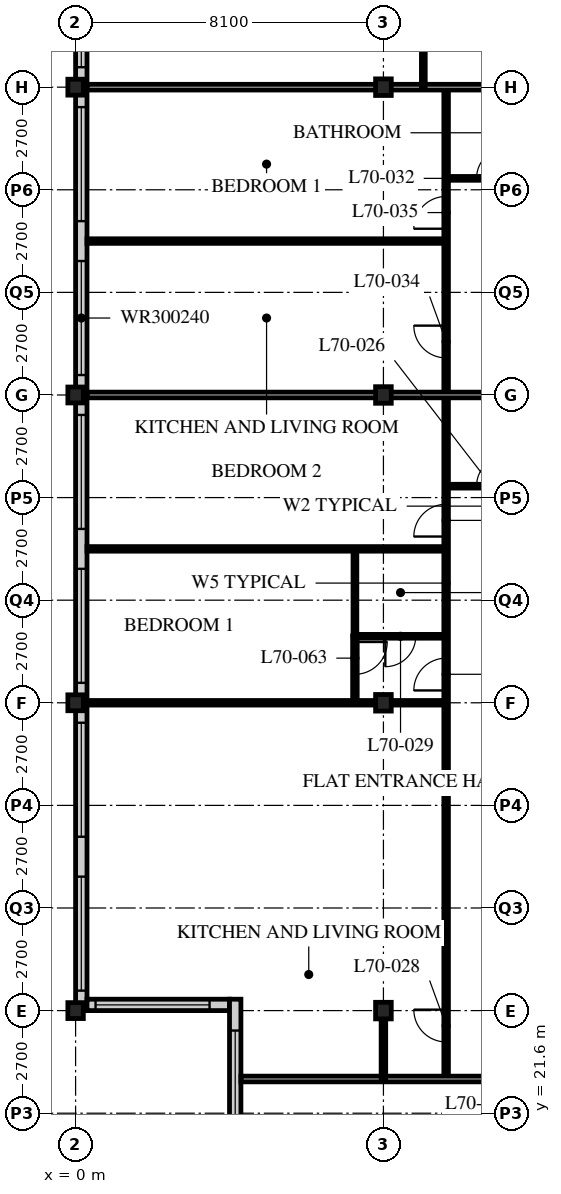
"""IFC4 building model, lengths in metres.
Left out: names, types, materials, properties, quantities, classifications, styles, units other than length and angle.
Written with IfcOpenShell. Run it as: python <this file> out.ifc"""

import sys

from ifc_helpers import new_model, si_unit, direction, frame, frame_2d, origin, origin_2d, place, context, subcontext, project, spatial, rectangle, i_section, extrude, element, fill, save


model = new_model("IFC4")
c1 = context("Model", 3, precision=1e-05, world=origin(), true_north=direction((0.0, 1.0)))
c2 = subcontext(c1, "Body", "Model", "MODEL_VIEW")
j1 = project(units=[si_unit("LENGTHUNIT", "METRE"), si_unit("PLANEANGLEUNIT", "RADIAN")], contexts=[c1])
p1 = place(None, origin())
s1 = spatial("IfcSite", under=j1, at=p1, CompositionType="ELEMENT")
p2 = place(p1, origin())
s2 = spatial("IfcBuilding", under=s1, at=p2, CompositionType="ELEMENT")
p3 = place(p2, frame((0.0, 0.0, 273.6)))
s3 = spatial("IfcBuildingStorey", under=s2, at=p3, CompositionType="ELEMENT", Elevation=273.6)
for number, where, z_axis, x_axis in (
    (1, (0.0, 24.3, 0.0), (0.0, 0.0, 1.0), (1.0, 0.0, 0.0)),
    (2, (0.0, 32.4, 0.0), (0.0, 0.0, 1.0), (1.0, 0.0, 0.0)),
    (3, (0.0, 40.5, 0.0), (0.0, 0.0, 1.0), (1.0, 0.0, 0.0)),
    (4, (0.0, 48.6, 0.0), (0.0, 0.0, 1.0), (1.0, 0.0, 0.0)),
):
    element("IfcColumn", number, at=place(p3, frame(where, z_axis=z_axis, x_axis=x_axis)), inside=s3, PredefinedType="COLUMN", context=c2, shape_type="SweptSolid", body=[
        extrude(i_section(OverallWidth=0.407, OverallDepth=0.419, WebThickness=0.031, FlangeThickness=0.049, FilletRadius=0.015, at=origin_2d()), origin(), (0.0, 0.0, 1.0), 3.9),
    ])
for number, where, z_axis, x_axis in (
    (5, (8.1, 24.3, 0.0), (0.0, 0.0, 1.0), (1.0, 0.0, 0.0)),
    (6, (8.1, 32.4, 0.0), (0.0, 0.0, 1.0), (1.0, 0.0, 0.0)),
    (7, (8.1, 40.5, 0.0), (0.0, 0.0, 1.0), (1.0, 0.0, 0.0)),
    (8, (8.1, 48.6, 0.0), (0.0, 0.0, 1.0), (1.0, 0.0, 0.0)),
):
    element("IfcColumn", number, at=place(p3, frame(where, z_axis=z_axis, x_axis=x_axis)), inside=s3, PredefinedType="COLUMN", context=c2, shape_type="SweptSolid", body=[
        extrude(i_section(OverallWidth=0.412, OverallDepth=0.437, WebThickness=0.036, FlangeThickness=0.058, FilletRadius=0.015, at=origin_2d()), origin(), (0.0, 0.0, 1.0), 3.9),
    ])
p4 = place(p3, frame((0.15, 56.4, 0.0), z_axis=(0.0, 0.0, 1.0), x_axis=(0.0, -1.0, 0.0)))
e9 = element("IfcWall", 9, at=p4, inside=s3, PredefinedType="SOLIDWALL", context=c2, shape_type="SweptSolid", body=[
    extrude(rectangle(XDim=32.1, YDim=0.3, at=frame_2d((16.05, 0.0))), origin(), (0.0, 0.0, 1.0), 3.69),
])
p5 = place(p4, frame((0.225, 0.0, 0.6)))
e10 = element("IfcOpeningElement", 10, at=p5, cuts=e9, PredefinedType="OPENING", context=c2, shape_type="SweptSolid", body=[
    extrude(rectangle(XDim=3.0, YDim=2.4, at=frame_2d((1.5, 1.2))), frame((0.0, 0.16, 0.0), z_axis=(0.0, -1.0, 0.0), x_axis=(1.0, 0.0, 0.0)), (0.0, 0.0, 1.0), 0.32),
])
p6 = place(p4, frame((4.275, 0.0, 0.6)))
e11 = element("IfcOpeningElement", 11, at=p6, cuts=e9, PredefinedType="OPENING", context=c2, shape_type="SweptSolid", body=[
    extrude(rectangle(XDim=3.0, YDim=2.4, at=frame_2d((1.5, 1.2))), frame((0.0, 0.16, 0.0), z_axis=(0.0, -1.0, 0.0), x_axis=(1.0, 0.0, 0.0)), (0.0, 0.0, 1.0), 0.32),
])
p7 = place(p4, frame((8.325, 0.0, 0.6)))
e12 = element("IfcOpeningElement", 12, at=p7, cuts=e9, PredefinedType="OPENING", context=c2, shape_type="SweptSolid", body=[
    extrude(rectangle(XDim=3.0, YDim=2.4, at=frame_2d((1.5, 1.2))), frame((0.0, 0.16, 0.0), z_axis=(0.0, -1.0, 0.0), x_axis=(1.0, 0.0, 0.0)), (0.0, 0.0, 1.0), 0.32),
])
p8 = place(p4, frame((12.375, 0.0, 0.6)))
e13 = element("IfcOpeningElement", 13, at=p8, cuts=e9, PredefinedType="OPENING", context=c2, shape_type="SweptSolid", body=[
    extrude(rectangle(XDim=3.0, YDim=2.4, at=frame_2d((1.5, 1.2))), frame((0.0, 0.16, 0.0), z_axis=(0.0, -1.0, 0.0), x_axis=(1.0, 0.0, 0.0)), (0.0, 0.0, 1.0), 0.32),
])
p9 = place(p4, frame((16.425, 0.0, 0.6)))
e14 = element("IfcOpeningElement", 14, at=p9, cuts=e9, PredefinedType="OPENING", context=c2, shape_type="SweptSolid", body=[
    extrude(rectangle(XDim=3.0, YDim=2.4, at=frame_2d((1.5, 1.2))), frame((0.0, 0.16, 0.0), z_axis=(0.0, -1.0, 0.0), x_axis=(1.0, 0.0, 0.0)), (0.0, 0.0, 1.0), 0.32),
])
p10 = place(p4, frame((20.475, 0.0, 0.6)))
e15 = element("IfcOpeningElement", 15, at=p10, cuts=e9, PredefinedType="OPENING", context=c2, shape_type="SweptSolid", body=[
    extrude(rectangle(XDim=3.0, YDim=2.4, at=frame_2d((1.5, 1.2))), frame((0.0, 0.16, 0.0), z_axis=(0.0, -1.0, 0.0), x_axis=(1.0, 0.0, 0.0)), (0.0, 0.0, 1.0), 0.32),
])
p11 = place(p4, frame((24.525, 0.0, 0.6)))
e16 = element("IfcOpeningElement", 16, at=p11, cuts=e9, PredefinedType="OPENING", context=c2, shape_type="SweptSolid", body=[
    extrude(rectangle(XDim=3.0, YDim=2.4, at=frame_2d((1.5, 1.2))), frame((0.0, 0.16, 0.0), z_axis=(0.0, -1.0, 0.0), x_axis=(1.0, 0.0, 0.0)), (0.0, 0.0, 1.0), 0.32),
])
p12 = place(p4, frame((28.575, 0.0, 0.6)))
e17 = element("IfcOpeningElement", 17, at=p12, cuts=e9, PredefinedType="OPENING", context=c2, shape_type="SweptSolid", body=[
    extrude(rectangle(XDim=3.0, YDim=2.4, at=frame_2d((1.5, 1.2))), frame((0.0, 0.16, 0.0), z_axis=(0.0, -1.0, 0.0), x_axis=(1.0, 0.0, 0.0)), (0.0, 0.0, 1.0), 0.32),
])
p13 = place(p3, frame((0.3, 24.45, 0.0), z_axis=(0.0, 0.0, 1.0), x_axis=(1.0, 0.0, 0.0)))
e18 = element("IfcWall", 18, at=p13, inside=s3, PredefinedType="SOLIDWALL", context=c2, shape_type="SweptSolid", body=[
    extrude(rectangle(XDim=3.75, YDim=0.3, at=frame_2d((1.875, 0.0))), origin(), (0.0, 0.0, 1.0), 3.69),
])
p14 = place(p13, frame((0.225, 0.0, 0.6)))
e19 = element("IfcOpeningElement", 19, at=p14, cuts=e18, PredefinedType="OPENING", context=c2, shape_type="SweptSolid", body=[
    extrude(rectangle(XDim=3.0, YDim=2.3, at=frame_2d((1.5, 1.15))), frame((0.0, 0.16, 0.0), z_axis=(0.0, -1.0, 0.0), x_axis=(1.0, 0.0, 0.0)), (0.0, 0.0, 1.0), 0.32),
])
p15 = place(p3, frame((4.2, 24.6, 0.0), z_axis=(0.0, 0.0, 1.0), x_axis=(0.0, -1.0, 0.0)))
e20 = element("IfcWall", 20, at=p15, inside=s3, PredefinedType="SOLIDWALL", context=c2, shape_type="SweptSolid", body=[
    extrude(rectangle(XDim=4.35, YDim=0.3, at=frame_2d((2.175, 0.0))), origin(), (0.0, 0.0, 1.0), 3.69),
])
p16 = place(p15, frame((0.825, 0.0, 0.6)))
e21 = element("IfcOpeningElement", 21, at=p16, cuts=e20, PredefinedType="OPENING", context=c2, shape_type="SweptSolid", body=[
    extrude(rectangle(XDim=3.0, YDim=2.3, at=frame_2d((1.5, 1.15))), frame((0.0, 0.16, 0.0), z_axis=(0.0, -1.0, 0.0), x_axis=(1.0, 0.0, 0.0)), (0.0, 0.0, 1.0), 0.32),
])
p17 = place(p3, frame((9.75, 22.5, 0.0), z_axis=(0.0, 0.0, 1.0), x_axis=(0.0, 1.0, 0.0)))
e22 = element("IfcWall", 22, at=p17, inside=s3, PredefinedType="PARTITIONING", context=c2, shape_type="SweptSolid", body=[
    extrude(rectangle(XDim=26.1, YDim=0.12, at=frame_2d((13.05, 0.0))), origin(), (0.0, 0.0, 1.0), 3.69),
])
p18 = place(p17, frame((0.975, 0.0, 0.0)))
e23 = element("IfcOpeningElement", 23, at=p18, cuts=e22, PredefinedType="OPENING", context=c2, shape_type="SweptSolid", body=[
    extrude(rectangle(XDim=0.85, YDim=2.1, at=frame_2d((0.425, 1.05))), frame((0.0, 0.07, 0.0), z_axis=(0.0, -1.0, 0.0), x_axis=(1.0, 0.0, 0.0)), (0.0, 0.0, 1.0), 0.14),
])
p19 = place(p17, frame((10.225, 0.0, 0.0)))
e24 = element("IfcOpeningElement", 24, at=p19, cuts=e22, PredefinedType="OPENING", context=c2, shape_type="SweptSolid", body=[
    extrude(rectangle(XDim=0.85, YDim=2.1, at=frame_2d((0.425, 1.05))), frame((0.0, 0.07, 0.0), z_axis=(0.0, -1.0, 0.0), x_axis=(1.0, 0.0, 0.0)), (0.0, 0.0, 1.0), 0.14),
])
p20 = place(p17, frame((14.275, 0.0, 0.0)))
e25 = element("IfcOpeningElement", 25, at=p20, cuts=e22, PredefinedType="OPENING", context=c2, shape_type="SweptSolid", body=[
    extrude(rectangle(XDim=0.85, YDim=2.1, at=frame_2d((0.425, 1.05))), frame((0.0, 0.07, 0.0), z_axis=(0.0, -1.0, 0.0), x_axis=(1.0, 0.0, 0.0)), (0.0, 0.0, 1.0), 0.14),
])
p21 = place(p17, frame((18.975, 0.0, 0.0)))
e26 = element("IfcOpeningElement", 26, at=p21, cuts=e22, PredefinedType="OPENING", context=c2, shape_type="SweptSolid", body=[
    extrude(rectangle(XDim=0.85, YDim=2.1, at=frame_2d((0.425, 1.05))), frame((0.0, 0.07, 0.0), z_axis=(0.0, -1.0, 0.0), x_axis=(1.0, 0.0, 0.0)), (0.0, 0.0, 1.0), 0.14),
])
p22 = place(p17, frame((22.375, 0.0, 0.0)))
e27 = element("IfcOpeningElement", 27, at=p22, cuts=e22, PredefinedType="OPENING", context=c2, shape_type="SweptSolid", body=[
    extrude(rectangle(XDim=0.85, YDim=2.1, at=frame_2d((0.425, 1.05))), frame((0.0, 0.07, 0.0), z_axis=(0.0, -1.0, 0.0), x_axis=(1.0, 0.0, 0.0)), (0.0, 0.0, 1.0), 0.14),
])
p23 = place(p3, frame((12.15, 38.1, 0.0), z_axis=(0.0, 0.0, 1.0), x_axis=(-1.0, 0.0, 0.0)))
e28 = element("IfcWall", 28, at=p23, inside=s3, PredefinedType="PARTITIONING", context=c2, shape_type="SweptSolid", body=[
    extrude(rectangle(XDim=2.4, YDim=0.1, at=frame_2d((1.2, 0.0))), origin(), (0.0, 0.0, 1.0), 3.69),
])
p24 = place(p23, frame((0.8, 0.0, 0.0)))
e29 = element("IfcOpeningElement", 29, at=p24, cuts=e28, PredefinedType="OPENING", context=c2, shape_type="SweptSolid", body=[
    extrude(rectangle(XDim=0.8, YDim=2.1, at=frame_2d((0.4, 1.05))), frame((0.0, 0.06, 0.0), z_axis=(0.0, -1.0, 0.0), x_axis=(1.0, 0.0, 0.0)), (0.0, 0.0, 1.0), 0.12),
])
p25 = place(p3, frame((9.75, 34.15, 0.0), z_axis=(0.0, 0.0, 1.0), x_axis=(-1.0, 0.0, 0.0)))
e30 = element("IfcWall", 30, at=p25, inside=s3, PredefinedType="PARTITIONING", context=c2, shape_type="SweptSolid", body=[
    extrude(rectangle(XDim=2.4, YDim=0.1, at=frame_2d((1.2, 0.0))), origin(), (0.0, 0.0, 1.0), 3.69),
])
p26 = place(p25, frame((0.8, 0.0, 0.0)))
e31 = element("IfcOpeningElement", 31, at=p26, cuts=e30, PredefinedType="OPENING", context=c2, shape_type="SweptSolid", body=[
    extrude(rectangle(XDim=0.8, YDim=2.1, at=frame_2d((0.4, 1.05))), frame((0.0, 0.06, 0.0), z_axis=(0.0, -1.0, 0.0), x_axis=(1.0, 0.0, 0.0)), (0.0, 0.0, 1.0), 0.12),
])
p27 = place(p3, frame((7.35, 34.15, 0.0), z_axis=(0.0, 0.0, 1.0), x_axis=(0.0, 1.0, 0.0)))
e32 = element("IfcWall", 32, at=p27, inside=s3, PredefinedType="PARTITIONING", context=c2, shape_type="SweptSolid", body=[
    extrude(rectangle(XDim=2.3, YDim=0.1, at=frame_2d((1.15, 0.0))), origin(), (0.0, 0.0, 1.0), 3.69),
])
p28 = place(p3, frame((9.75, 32.4, 0.0), z_axis=(0.0, 0.0, 1.0), x_axis=(-1.0, 0.0, 0.0)))
e33 = element("IfcWall", 33, at=p28, inside=s3, PredefinedType="PARTITIONING", context=c2, shape_type="SweptSolid", body=[
    extrude(rectangle(XDim=9.45, YDim=0.12, at=frame_2d((4.725, 0.0))), origin(), (0.0, 0.0, 1.0), 3.078),
])
p29 = place(p3, frame((9.75, 36.45, 0.0), z_axis=(0.0, 0.0, 1.0), x_axis=(-1.0, 0.0, 0.0)))
e34 = element("IfcWall", 34, at=p29, inside=s3, PredefinedType="PARTITIONING", context=c2, shape_type="SweptSolid", body=[
    extrude(rectangle(XDim=9.45, YDim=0.12, at=frame_2d((4.725, 0.0))), origin(), (0.0, 0.0, 1.0), 3.69),
])
p30 = place(p3, frame((12.15, 40.5, 0.0), z_axis=(0.0, 0.0, 1.0), x_axis=(-1.0, 0.0, 0.0)))
e35 = element("IfcWall", 35, at=p30, inside=s3, PredefinedType="PARTITIONING", context=c2, shape_type="SweptSolid", body=[
    extrude(rectangle(XDim=11.85, YDim=0.15, at=frame_2d((5.925, 0.0))), origin(), (0.0, 0.0, 1.0), 3.078),
])
p31 = place(p3, frame((12.15, 46.2, 0.0), z_axis=(0.0, 0.0, 1.0), x_axis=(-1.0, 0.0, 0.0)))
e36 = element("IfcWall", 36, at=p31, inside=s3, PredefinedType="PARTITIONING", context=c2, shape_type="SweptSolid", body=[
    extrude(rectangle(XDim=2.4, YDim=0.1, at=frame_2d((1.2, 0.0))), origin(), (0.0, 0.0, 1.0), 3.69),
])
p32 = place(p31, frame((0.8, 0.0, 0.0)))
e37 = element("IfcOpeningElement", 37, at=p32, cuts=e36, PredefinedType="OPENING", context=c2, shape_type="SweptSolid", body=[
    extrude(rectangle(XDim=0.8, YDim=2.1, at=frame_2d((0.4, 1.05))), frame((0.0, 0.06, 0.0), z_axis=(0.0, -1.0, 0.0), x_axis=(1.0, 0.0, 0.0)), (0.0, 0.0, 1.0), 0.12),
])
p33 = place(p3, frame((9.75, 44.55, 0.0), z_axis=(0.0, 0.0, 1.0), x_axis=(-1.0, 0.0, 0.0)))
e38 = element("IfcWall", 38, at=p33, inside=s3, PredefinedType="PARTITIONING", context=c2, shape_type="SweptSolid", body=[
    extrude(rectangle(XDim=9.45, YDim=0.12, at=frame_2d((4.725, 0.0))), origin(), (0.0, 0.0, 1.0), 3.69),
])
p34 = place(p3, frame((12.15, 48.6, 0.0), z_axis=(0.0, 0.0, 1.0), x_axis=(-1.0, 0.0, 0.0)))
e39 = element("IfcWall", 39, at=p34, inside=s3, PredefinedType="PARTITIONING", context=c2, shape_type="SweptSolid", body=[
    extrude(rectangle(XDim=11.85, YDim=0.15, at=frame_2d((5.925, 0.0))), origin(), (0.0, 0.0, 1.0), 3.078),
])
p35 = place(p3, frame((9.15, 48.6, 0.0), z_axis=(0.0, 0.0, 1.0), x_axis=(0.0, 1.0, 0.0)))
e40 = element("IfcWall", 40, at=p35, inside=s3, PredefinedType="PARTITIONING", context=c2, shape_type="SweptSolid", body=[
    extrude(rectangle(XDim=2.2, YDim=0.1, at=frame_2d((1.1, 0.0))), origin(), (0.0, 0.0, 1.0), 3.69),
])
p36 = place(p3, frame((4.35, 22.5, 0.0), z_axis=(0.0, 0.0, 1.0), x_axis=(1.0, 0.0, 0.0)))
e41 = element("IfcWall", 41, at=p36, inside=s3, PredefinedType="PARTITIONING", context=c2, shape_type="SweptSolid", body=[
    extrude(rectangle(XDim=7.8, YDim=0.15, at=frame_2d((3.9, 0.0))), origin(), (0.0, 0.0, 1.0), 3.69),
])
p37 = place(p3, frame((7.35, 32.4, 0.0), z_axis=(0.0, 0.0, 1.0), x_axis=(0.0, 1.0, 0.0)))
e42 = element("IfcWall", 42, at=p37, inside=s3, PredefinedType="PARTITIONING", context=c2, shape_type="SweptSolid", body=[
    extrude(rectangle(XDim=1.76, YDim=0.12, at=frame_2d((0.88, 0.0))), origin(), (0.0, 0.0, 1.0), 3.69),
])
p38 = place(p37, frame((0.75, 0.0, 0.0)))
e43 = element("IfcOpeningElement", 43, at=p38, cuts=e42, PredefinedType="OPENING", context=c2, shape_type="SweptSolid", body=[
    extrude(rectangle(XDim=0.85, YDim=2.1, at=frame_2d((0.425, 1.05))), frame((0.0, 0.07, 0.0), z_axis=(0.0, -1.0, 0.0), x_axis=(1.0, 0.0, 0.0)), (0.0, 0.0, 1.0), 0.14),
])
p39 = place(p3, frame((8.1, 22.5, 0.0), z_axis=(0.0, 0.0, 1.0), x_axis=(0.0, 1.0, 0.0)))
e44 = element("IfcWall", 44, at=p39, inside=s3, PredefinedType="PARTITIONING", context=c2, shape_type="SweptSolid", body=[
    extrude(rectangle(XDim=1.597, YDim=0.12, at=frame_2d((0.798, 0.0))), origin(), (0.0, 0.0, 1.0), 3.078),
])
p40 = place(p6, origin())
e45 = element("IfcWindow", 45, at=p40, inside=s3, PartitioningType="SINGLE_PANEL", PredefinedType="WINDOW", context=c2, shape_type="SweptSolid", body=[
    extrude(rectangle(XDim=3.0, YDim=2.4, at=frame_2d((1.5, 1.2))), frame((0.0, 0.03, 0.0), z_axis=(0.0, -1.0, 0.0), x_axis=(1.0, 0.0, 0.0)), (0.0, 0.0, 1.0), 0.06),
])
fill(e11, e45)
p41 = place(p7, origin())
e46 = element("IfcWindow", 46, at=p41, inside=s3, PartitioningType="SINGLE_PANEL", PredefinedType="WINDOW", context=c2, shape_type="SweptSolid", body=[
    extrude(rectangle(XDim=3.0, YDim=2.4, at=frame_2d((1.5, 1.2))), frame((0.0, 0.03, 0.0), z_axis=(0.0, -1.0, 0.0), x_axis=(1.0, 0.0, 0.0)), (0.0, 0.0, 1.0), 0.06),
])
fill(e12, e46)
p42 = place(p8, origin())
e47 = element("IfcWindow", 47, at=p42, inside=s3, PartitioningType="SINGLE_PANEL", PredefinedType="WINDOW", context=c2, shape_type="SweptSolid", body=[
    extrude(rectangle(XDim=3.0, YDim=2.4, at=frame_2d((1.5, 1.2))), frame((0.0, 0.03, 0.0), z_axis=(0.0, -1.0, 0.0), x_axis=(1.0, 0.0, 0.0)), (0.0, 0.0, 1.0), 0.06),
])
fill(e13, e47)
p43 = place(p9, origin())
e48 = element("IfcWindow", 48, at=p43, inside=s3, PartitioningType="SINGLE_PANEL", PredefinedType="WINDOW", context=c2, shape_type="SweptSolid", body=[
    extrude(rectangle(XDim=3.0, YDim=2.4, at=frame_2d((1.5, 1.2))), frame((0.0, 0.03, 0.0), z_axis=(0.0, -1.0, 0.0), x_axis=(1.0, 0.0, 0.0)), (0.0, 0.0, 1.0), 0.06),
])
fill(e14, e48)
p44 = place(p10, origin())
e49 = element("IfcWindow", 49, at=p44, inside=s3, PartitioningType="SINGLE_PANEL", PredefinedType="WINDOW", context=c2, shape_type="SweptSolid", body=[
    extrude(rectangle(XDim=3.0, YDim=2.4, at=frame_2d((1.5, 1.2))), frame((0.0, 0.03, 0.0), z_axis=(0.0, -1.0, 0.0), x_axis=(1.0, 0.0, 0.0)), (0.0, 0.0, 1.0), 0.06),
])
fill(e15, e49)
p45 = place(p11, origin())
e50 = element("IfcWindow", 50, at=p45, inside=s3, PartitioningType="SINGLE_PANEL", PredefinedType="WINDOW", context=c2, shape_type="SweptSolid", body=[
    extrude(rectangle(XDim=3.0, YDim=2.4, at=frame_2d((1.5, 1.2))), frame((0.0, 0.03, 0.0), z_axis=(0.0, -1.0, 0.0), x_axis=(1.0, 0.0, 0.0)), (0.0, 0.0, 1.0), 0.06),
])
fill(e16, e50)
p46 = place(p12, origin())
e51 = element("IfcWindow", 51, at=p46, inside=s3, PartitioningType="SINGLE_PANEL", PredefinedType="WINDOW", context=c2, shape_type="SweptSolid", body=[
    extrude(rectangle(XDim=3.0, YDim=2.4, at=frame_2d((1.5, 1.2))), frame((0.0, 0.03, 0.0), z_axis=(0.0, -1.0, 0.0), x_axis=(1.0, 0.0, 0.0)), (0.0, 0.0, 1.0), 0.06),
])
fill(e17, e51)
p47 = place(p14, origin())
e52 = element("IfcWindow", 52, at=p47, inside=s3, PartitioningType="SINGLE_PANEL", PredefinedType="WINDOW", context=c2, shape_type="SweptSolid", body=[
    extrude(rectangle(XDim=3.0, YDim=2.3, at=frame_2d((1.5, 1.15))), frame((0.0, 0.03, 0.0), z_axis=(0.0, -1.0, 0.0), x_axis=(1.0, 0.0, 0.0)), (0.0, 0.0, 1.0), 0.06),
])
fill(e19, e52)
p48 = place(p16, origin())
e53 = element("IfcWindow", 53, at=p48, inside=s3, PartitioningType="SINGLE_PANEL", PredefinedType="WINDOW", context=c2, shape_type="SweptSolid", body=[
    extrude(rectangle(XDim=3.0, YDim=2.3, at=frame_2d((1.5, 1.15))), frame((0.0, 0.03, 0.0), z_axis=(0.0, -1.0, 0.0), x_axis=(1.0, 0.0, 0.0)), (0.0, 0.0, 1.0), 0.06),
])
fill(e21, e53)
p49 = place(p24, origin())
e54 = element("IfcDoor", 54, at=p49, inside=s3, OperationType="SINGLE_SWING_RIGHT", PredefinedType="DOOR", context=c2, shape_type="SweptSolid", body=[
    extrude(rectangle(XDim=0.8, YDim=2.1, at=frame_2d((0.4, 1.05))), frame((0.0, 0.025, 0.0), z_axis=(0.0, -1.0, 0.0), x_axis=(1.0, 0.0, 0.0)), (0.0, 0.0, 1.0), 0.05),
])
fill(e29, e54)
p50 = place(p18, origin())
e55 = element("IfcDoor", 55, at=p50, inside=s3, OperationType="SINGLE_SWING_RIGHT", PredefinedType="DOOR", context=c2, shape_type="SweptSolid", body=[
    extrude(rectangle(XDim=0.85, YDim=2.1, at=frame_2d((0.425, 1.05))), frame((0.0, 0.025, 0.0), z_axis=(0.0, -1.0, 0.0), x_axis=(1.0, 0.0, 0.0)), (0.0, 0.0, 1.0), 0.05),
])
fill(e23, e55)
p51 = place(p26, origin())
e56 = element("IfcDoor", 56, at=p51, inside=s3, OperationType="SINGLE_SWING_RIGHT", PredefinedType="DOOR", context=c2, shape_type="SweptSolid", body=[
    extrude(rectangle(XDim=0.8, YDim=2.1, at=frame_2d((0.4, 1.05))), frame((0.0, 0.025, 0.0), z_axis=(0.0, -1.0, 0.0), x_axis=(1.0, 0.0, 0.0)), (0.0, 0.0, 1.0), 0.05),
])
fill(e31, e56)
p52 = place(p19, origin())
e57 = element("IfcDoor", 57, at=p52, inside=s3, OperationType="SINGLE_SWING_LEFT", PredefinedType="DOOR", context=c2, shape_type="SweptSolid", body=[
    extrude(rectangle(XDim=0.85, YDim=2.1, at=frame_2d((0.425, 1.05))), frame((0.0, 0.025, 0.0), z_axis=(0.0, -1.0, 0.0), x_axis=(1.0, 0.0, 0.0)), (0.0, 0.0, 1.0), 0.05),
])
fill(e24, e57)
p53 = place(p20, origin())
e58 = element("IfcDoor", 58, at=p53, inside=s3, OperationType="SINGLE_SWING_LEFT", PredefinedType="DOOR", context=c2, shape_type="SweptSolid", body=[
    extrude(rectangle(XDim=0.85, YDim=2.1, at=frame_2d((0.425, 1.05))), frame((0.0, 0.025, 0.0), z_axis=(0.0, -1.0, 0.0), x_axis=(1.0, 0.0, 0.0)), (0.0, 0.0, 1.0), 0.05),
])
fill(e25, e58)
p54 = place(p32, origin())
e59 = element("IfcDoor", 59, at=p54, inside=s3, OperationType="SINGLE_SWING_RIGHT", PredefinedType="DOOR", context=c2, shape_type="SweptSolid", body=[
    extrude(rectangle(XDim=0.8, YDim=2.1, at=frame_2d((0.4, 1.05))), frame((0.0, 0.025, 0.0), z_axis=(0.0, -1.0, 0.0), x_axis=(1.0, 0.0, 0.0)), (0.0, 0.0, 1.0), 0.05),
])
fill(e37, e59)
p55 = place(p21, origin())
e60 = element("IfcDoor", 60, at=p55, inside=s3, OperationType="SINGLE_SWING_RIGHT", PredefinedType="DOOR", context=c2, shape_type="SweptSolid", body=[
    extrude(rectangle(XDim=0.85, YDim=2.1, at=frame_2d((0.425, 1.05))), frame((0.0, 0.025, 0.0), z_axis=(0.0, -1.0, 0.0), x_axis=(1.0, 0.0, 0.0)), (0.0, 0.0, 1.0), 0.05),
])
fill(e26, e60)
p56 = place(p22, origin())
e61 = element("IfcDoor", 61, at=p56, inside=s3, OperationType="SINGLE_SWING_LEFT", PredefinedType="DOOR", context=c2, shape_type="SweptSolid", body=[
    extrude(rectangle(XDim=0.85, YDim=2.1, at=frame_2d((0.425, 1.05))), frame((0.0, 0.025, 0.0), z_axis=(0.0, -1.0, 0.0), x_axis=(1.0, 0.0, 0.0)), (0.0, 0.0, 1.0), 0.05),
])
fill(e27, e61)
p57 = place(p38, origin())
e62 = element("IfcDoor", 62, at=p57, inside=s3, OperationType="SINGLE_SWING_LEFT", PredefinedType="DOOR", context=c2, shape_type="SweptSolid", body=[
    extrude(rectangle(XDim=0.85, YDim=2.1, at=frame_2d((0.425, 1.05))), frame((0.0, 0.025, 0.0), z_axis=(0.0, -1.0, 0.0), x_axis=(1.0, 0.0, 0.0)), (0.0, 0.0, 1.0), 0.05),
])
fill(e43, e62)
save(model, sys.argv[1])
